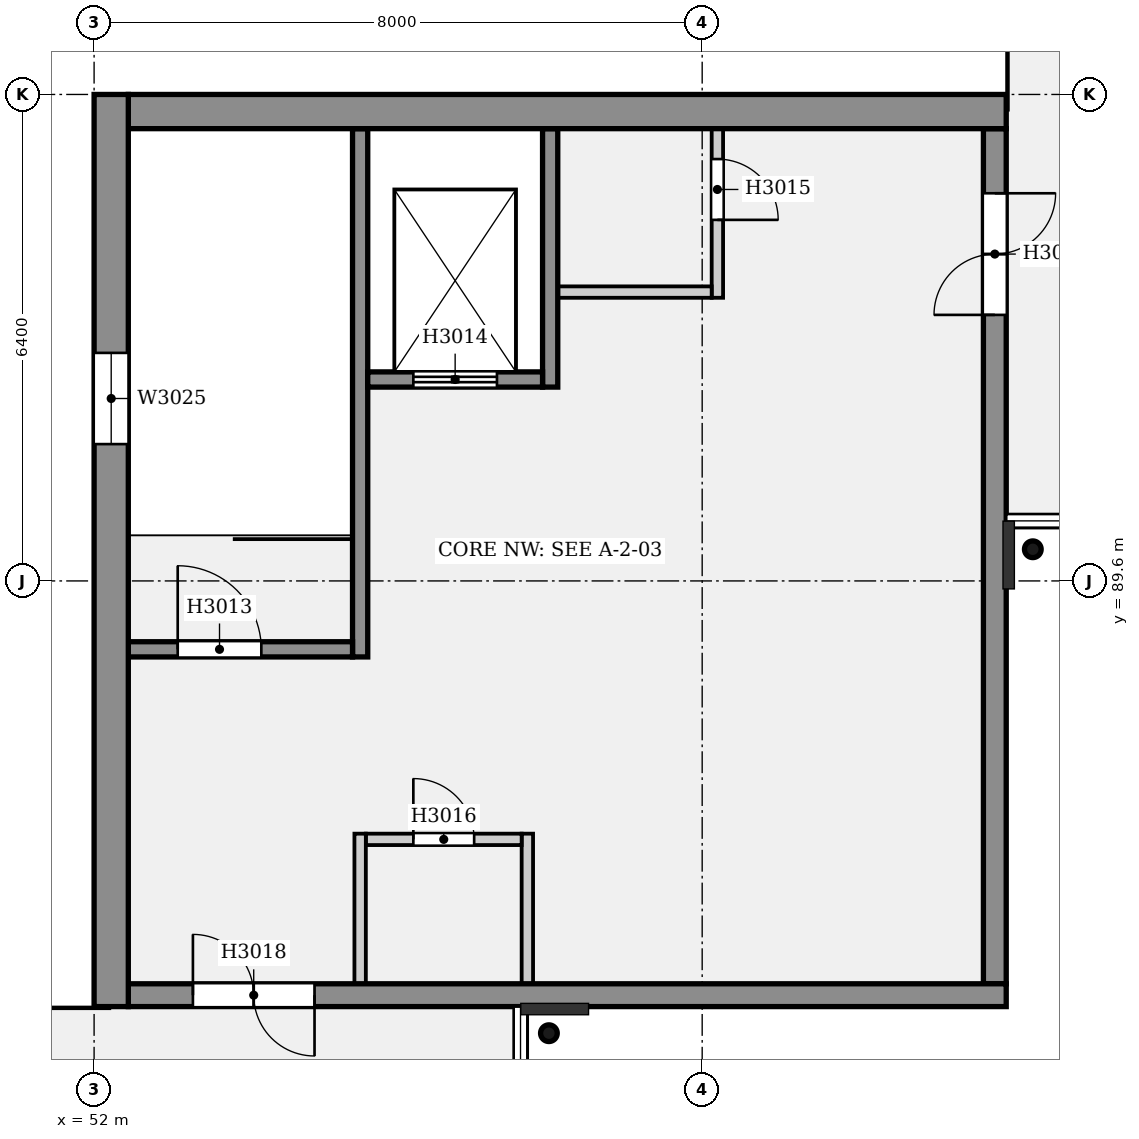
"""IFC4 building model, lengths in metres.
Left out: names, types, materials, properties, quantities, classifications, styles, units other than length and angle.
Written with IfcOpenShell. Run it as: python <this file> out.ifc"""

import sys

from ifc_helpers import new_model, si_unit, direction, frame, frame_2d, origin, origin_2d, place, context, subcontext, project, spatial, rectangle, hollow_circle, extrude, element, fill, save


model = new_model("IFC4")
c1 = context("Model", 3, precision=1e-05, world=origin(), true_north=direction((0.0, 1.0)))
c2 = subcontext(c1, "Body", "Model", "MODEL_VIEW")
j1 = project(units=[si_unit("LENGTHUNIT", "METRE"), si_unit("PLANEANGLEUNIT", "RADIAN")], contexts=[c1])
p1 = place(None, origin())
s1 = spatial("IfcSite", under=j1, at=p1, CompositionType="ELEMENT")
p2 = place(p1, origin())
s2 = spatial("IfcBuilding", under=s1, at=p2, CompositionType="ELEMENT")
p3 = place(p2, frame((0.0, 0.0, 13.8)))
s3 = spatial("IfcBuildingStorey", under=s2, at=p3, CompositionType="ELEMENT", Elevation=13.8)
p4 = place(p3, frame((52.225, 96.0, 0.0), z_axis=(0.0, 0.0, 1.0), x_axis=(0.0, -1.0, 0.0)))
e1 = element("IfcWall", 1, at=p4, inside=s3, PredefinedType="ELEMENTEDWALL", context=c2, shape_type="SweptSolid", body=[
    extrude(rectangle(XDim=12.0, YDim=0.45, at=frame_2d((6.0, 0.0))), origin(), (0.0, 0.0, 1.0), 4.4),
])
p5 = place(p4, frame((3.4, 0.0, 0.6)))
e2 = element("IfcOpeningElement", 2, at=p5, cuts=e1, PredefinedType="OPENING", context=c2, shape_type="SweptSolid", body=[
    extrude(rectangle(XDim=1.2, YDim=3.0, at=frame_2d((0.6, 1.5))), frame((0.0, 0.235, 0.0), z_axis=(0.0, -1.0, 0.0), x_axis=(1.0, 0.0, 0.0)), (0.0, 0.0, 1.0), 0.47),
])
p6 = place(p3, frame((52.45, 95.775, 0.0), z_axis=(0.0, 0.0, 1.0), x_axis=(1.0, 0.0, 0.0)))
e3 = element("IfcWall", 3, at=p6, inside=s3, PredefinedType="ELEMENTEDWALL", context=c2, shape_type="SweptSolid", body=[
    extrude(rectangle(XDim=11.55, YDim=0.45, at=frame_2d((5.775, 0.0))), origin(), (0.0, 0.0, 1.0), 4.4),
])
p7 = place(p3, frame((63.85, 95.55, 0.0), z_axis=(0.0, 0.0, 1.0), x_axis=(0.0, -1.0, 0.0)))
e4 = element("IfcWall", 4, at=p7, inside=s3, PredefinedType="SOLIDWALL", context=c2, shape_type="SweptSolid", body=[
    extrude(rectangle(XDim=11.25, YDim=0.3, at=frame_2d((5.625, 0.0))), origin(), (0.0, 0.0, 1.0), 4.4),
])
p8 = place(p7, frame((0.85, 0.0, 0.0)))
e5 = element("IfcOpeningElement", 5, at=p8, cuts=e4, PredefinedType="OPENING", context=c2, shape_type="SweptSolid", body=[
    extrude(rectangle(XDim=1.6, YDim=2.1, at=frame_2d((0.8, 1.05))), frame((0.0, 0.16, 0.0), z_axis=(0.0, -1.0, 0.0), x_axis=(1.0, 0.0, 0.0)), (0.0, 0.0, 1.0), 0.32),
])
p9 = place(p3, frame((52.45, 84.15, 0.0), z_axis=(0.0, 0.0, 1.0), x_axis=(1.0, 0.0, 0.0)))
e6 = element("IfcWall", 6, at=p9, inside=s3, PredefinedType="SOLIDWALL", context=c2, shape_type="SweptSolid", body=[
    extrude(rectangle(XDim=11.55, YDim=0.3, at=frame_2d((5.775, 0.0))), origin(), (0.0, 0.0, 1.0), 4.4),
])
p10 = place(p9, frame((0.85, 0.0, 0.0)))
e7 = element("IfcOpeningElement", 7, at=p10, cuts=e6, PredefinedType="OPENING", context=c2, shape_type="SweptSolid", body=[
    extrude(rectangle(XDim=1.6, YDim=2.1, at=frame_2d((0.8, 1.05))), frame((0.0, 0.16, 0.0), z_axis=(0.0, -1.0, 0.0), x_axis=(1.0, 0.0, 0.0)), (0.0, 0.0, 1.0), 0.32),
])
for number, where, z_axis, x_axis in (
    (8, (64.35, 90.016, -0.128), (0.0, -0.199, 0.98), (1.0, 0.0, 0.0)),
    (9, (57.984, 83.65, -0.128), (0.199, 0.0, 0.98), (0.0, 1.0, 0.0)),
):
    element("IfcColumn", number, at=place(p3, frame(where, z_axis=z_axis, x_axis=x_axis)), inside=s3, PredefinedType="COLUMN", context=c2, shape_type="SweptSolid", body=[
        extrude(hollow_circle(Radius=0.11, WallThickness=0.013, at=origin_2d()), origin(), (0.0, 0.0, 1.0), 4.621),
    ])
p11 = place(p3, frame((55.5, 95.55, 0.0), z_axis=(0.0, 0.0, 1.0), x_axis=(0.0, -1.0, 0.0)))
e10 = element("IfcWall", 10, at=p11, inside=s3, PredefinedType="SOLIDWALL", context=c2, shape_type="SweptSolid", body=[
    extrude(rectangle(XDim=6.95, YDim=0.2, at=frame_2d((3.475, 0.0))), origin(), (0.0, 0.0, 1.0), 4.4),
])
p12 = place(p3, frame((52.45, 88.7, 0.0), z_axis=(0.0, 0.0, 1.0), x_axis=(1.0, 0.0, 0.0)))
e11 = element("IfcWall", 11, at=p12, inside=s3, PredefinedType="SOLIDWALL", context=c2, shape_type="SweptSolid", body=[
    extrude(rectangle(XDim=2.95, YDim=0.2, at=frame_2d((1.475, 0.0))), origin(), (0.0, 0.0, 1.0), 4.4),
])
p13 = place(p12, frame((0.65, 0.0, 0.0)))
e12 = element("IfcOpeningElement", 12, at=p13, cuts=e11, PredefinedType="OPENING", context=c2, shape_type="SweptSolid", body=[
    extrude(rectangle(XDim=1.1, YDim=2.1, at=frame_2d((0.55, 1.05))), frame((0.0, 0.11, 0.0), z_axis=(0.0, -1.0, 0.0), x_axis=(1.0, 0.0, 0.0)), (0.0, 0.0, 1.0), 0.22),
])
p14 = place(p3, frame((58.0, 95.55, 0.0), z_axis=(0.0, 0.0, 1.0), x_axis=(0.0, -1.0, 0.0)))
e13 = element("IfcWall", 13, at=p14, inside=s3, PredefinedType="SOLIDWALL", context=c2, shape_type="SweptSolid", body=[
    extrude(rectangle(XDim=3.4, YDim=0.2, at=frame_2d((1.7, 0.0))), origin(), (0.0, 0.0, 1.0), 4.4),
])
p15 = place(p3, frame((55.6, 92.25, 0.0), z_axis=(0.0, 0.0, 1.0), x_axis=(1.0, 0.0, 0.0)))
e14 = element("IfcWall", 14, at=p15, inside=s3, PredefinedType="SOLIDWALL", context=c2, shape_type="SweptSolid", body=[
    extrude(rectangle(XDim=2.3, YDim=0.2, at=frame_2d((1.15, 0.0))), origin(), (0.0, 0.0, 1.0), 4.4),
])
p16 = place(p15, frame((0.6, 0.0, 0.0)))
e15 = element("IfcOpeningElement", 15, at=p16, cuts=e14, PredefinedType="OPENING", context=c2, shape_type="SweptSolid", body=[
    extrude(rectangle(XDim=1.1, YDim=2.1, at=frame_2d((0.55, 1.05))), frame((0.0, 0.11, 0.0), z_axis=(0.0, -1.0, 0.0), x_axis=(1.0, 0.0, 0.0)), (0.0, 0.0, 1.0), 0.22),
])
p17 = place(p3, frame((58.1, 93.4, 0.0), z_axis=(0.0, 0.0, 1.0), x_axis=(1.0, 0.0, 0.0)))
e16 = element("IfcWall", 16, at=p17, inside=s3, PredefinedType="PARTITIONING", context=c2, shape_type="SweptSolid", body=[
    extrude(rectangle(XDim=2.025, YDim=0.15, at=frame_2d((1.012, 0.0))), origin(), (0.0, 0.0, 1.0), 4.4),
])
p18 = place(p3, frame((60.2, 95.55, 0.0), z_axis=(0.0, 0.0, 1.0), x_axis=(0.0, -1.0, 0.0)))
e17 = element("IfcWall", 17, at=p18, inside=s3, PredefinedType="PARTITIONING", context=c2, shape_type="SweptSolid", body=[
    extrude(rectangle(XDim=2.225, YDim=0.15, at=frame_2d((1.113, 0.0))), origin(), (0.0, 0.0, 1.0), 4.4),
])
p19 = place(p18, frame((0.4, 0.0, 0.0)))
e18 = element("IfcOpeningElement", 18, at=p19, cuts=e17, PredefinedType="OPENING", context=c2, shape_type="SweptSolid", body=[
    extrude(rectangle(XDim=0.8, YDim=2.1, at=frame_2d((0.4, 1.05))), frame((0.0, 0.085, 0.0), z_axis=(0.0, -1.0, 0.0), x_axis=(1.0, 0.0, 0.0)), (0.0, 0.0, 1.0), 0.17),
])
p20 = place(p3, frame((55.575, 86.2, 0.0), z_axis=(0.0, 0.0, 1.0), x_axis=(1.0, 0.0, 0.0)))
e19 = element("IfcWall", 19, at=p20, inside=s3, PredefinedType="PARTITIONING", context=c2, shape_type="SweptSolid", body=[
    extrude(rectangle(XDim=2.05, YDim=0.15, at=frame_2d((1.025, 0.0))), origin(), (0.0, 0.0, 1.0), 4.4),
])
p21 = place(p20, frame((0.625, 0.0, 0.0)))
e20 = element("IfcOpeningElement", 20, at=p21, cuts=e19, PredefinedType="OPENING", context=c2, shape_type="SweptSolid", body=[
    extrude(rectangle(XDim=0.8, YDim=2.1, at=frame_2d((0.4, 1.05))), frame((0.0, 0.085, 0.0), z_axis=(0.0, -1.0, 0.0), x_axis=(1.0, 0.0, 0.0)), (0.0, 0.0, 1.0), 0.17),
])
for number, where, z_axis, x_axis in (
    (21, (55.5, 86.275, 0.0), (0.0, 0.0, 1.0), (0.0, -1.0, 0.0)),
    (22, (57.7, 86.275, 0.0), (0.0, 0.0, 1.0), (0.0, -1.0, 0.0)),
):
    element("IfcWall", number, at=place(p3, frame(where, z_axis=z_axis, x_axis=x_axis)), inside=s3, PredefinedType="PARTITIONING", context=c2, shape_type="SweptSolid", body=[
        extrude(rectangle(XDim=1.975, YDim=0.15, at=frame_2d((0.987, 0.0))), origin(), (0.0, 0.0, 1.0), 4.4),
    ])
p22 = place(p13, origin())
e23 = element("IfcDoor", 23, at=p22, inside=s3, OperationType="SINGLE_SWING_LEFT", PredefinedType="DOOR", context=c2, shape_type="SweptSolid", body=[
    extrude(rectangle(XDim=1.1, YDim=2.1, at=frame_2d((0.55, 1.05))), frame((0.0, 0.025, 0.0), z_axis=(0.0, -1.0, 0.0), x_axis=(1.0, 0.0, 0.0)), (0.0, 0.0, 1.0), 0.05),
])
fill(e12, e23)
p23 = place(p16, origin())
e24 = element("IfcDoor", 24, at=p23, inside=s3, OperationType="DOUBLE_DOOR_SLIDING", PredefinedType="DOOR", context=c2, shape_type="SweptSolid", body=[
    extrude(rectangle(XDim=1.1, YDim=2.1, at=frame_2d((0.55, 1.05))), frame((0.0, 0.025, 0.0), z_axis=(0.0, -1.0, 0.0), x_axis=(1.0, 0.0, 0.0)), (0.0, 0.0, 1.0), 0.05),
])
fill(e15, e24)
p24 = place(p19, origin())
e25 = element("IfcDoor", 25, at=p24, inside=s3, OperationType="SINGLE_SWING_RIGHT", PredefinedType="DOOR", context=c2, shape_type="SweptSolid", body=[
    extrude(rectangle(XDim=0.8, YDim=2.1, at=frame_2d((0.4, 1.05))), frame((0.0, 0.025, 0.0), z_axis=(0.0, -1.0, 0.0), x_axis=(1.0, 0.0, 0.0)), (0.0, 0.0, 1.0), 0.05),
])
fill(e18, e25)
p25 = place(p21, origin())
e26 = element("IfcDoor", 26, at=p25, inside=s3, OperationType="SINGLE_SWING_LEFT", PredefinedType="DOOR", context=c2, shape_type="SweptSolid", body=[
    extrude(rectangle(XDim=0.8, YDim=2.1, at=frame_2d((0.4, 1.05))), frame((0.0, 0.025, 0.0), z_axis=(0.0, -1.0, 0.0), x_axis=(1.0, 0.0, 0.0)), (0.0, 0.0, 1.0), 0.05),
])
fill(e20, e26)
p26 = place(p8, origin())
e27 = element("IfcDoor", 27, at=p26, inside=s3, OperationType="DOUBLE_DOOR_SINGLE_SWING", PredefinedType="DOOR", context=c2, shape_type="SweptSolid", body=[
    extrude(rectangle(XDim=1.6, YDim=2.1, at=frame_2d((0.8, 1.05))), frame((0.0, 0.025, 0.0), z_axis=(0.0, -1.0, 0.0), x_axis=(1.0, 0.0, 0.0)), (0.0, 0.0, 1.0), 0.05),
])
fill(e5, e27)
p27 = place(p10, origin())
e28 = element("IfcDoor", 28, at=p27, inside=s3, OperationType="DOUBLE_DOOR_SINGLE_SWING", PredefinedType="DOOR", context=c2, shape_type="SweptSolid", body=[
    extrude(rectangle(XDim=1.6, YDim=2.1, at=frame_2d((0.8, 1.05))), frame((0.0, 0.025, 0.0), z_axis=(0.0, -1.0, 0.0), x_axis=(1.0, 0.0, 0.0)), (0.0, 0.0, 1.0), 0.05),
])
fill(e7, e28)
p28 = place(p5, origin())
e29 = element("IfcWindow", 29, at=p28, inside=s3, PartitioningType="SINGLE_PANEL", PredefinedType="WINDOW", context=c2, shape_type="SweptSolid", body=[
    extrude(rectangle(XDim=1.2, YDim=3.0, at=frame_2d((0.6, 1.5))), frame((0.0, 0.03, 0.0), z_axis=(0.0, -1.0, 0.0), x_axis=(1.0, 0.0, 0.0)), (0.0, 0.0, 1.0), 0.06),
])
fill(e2, e29)
save(model, sys.argv[1])
